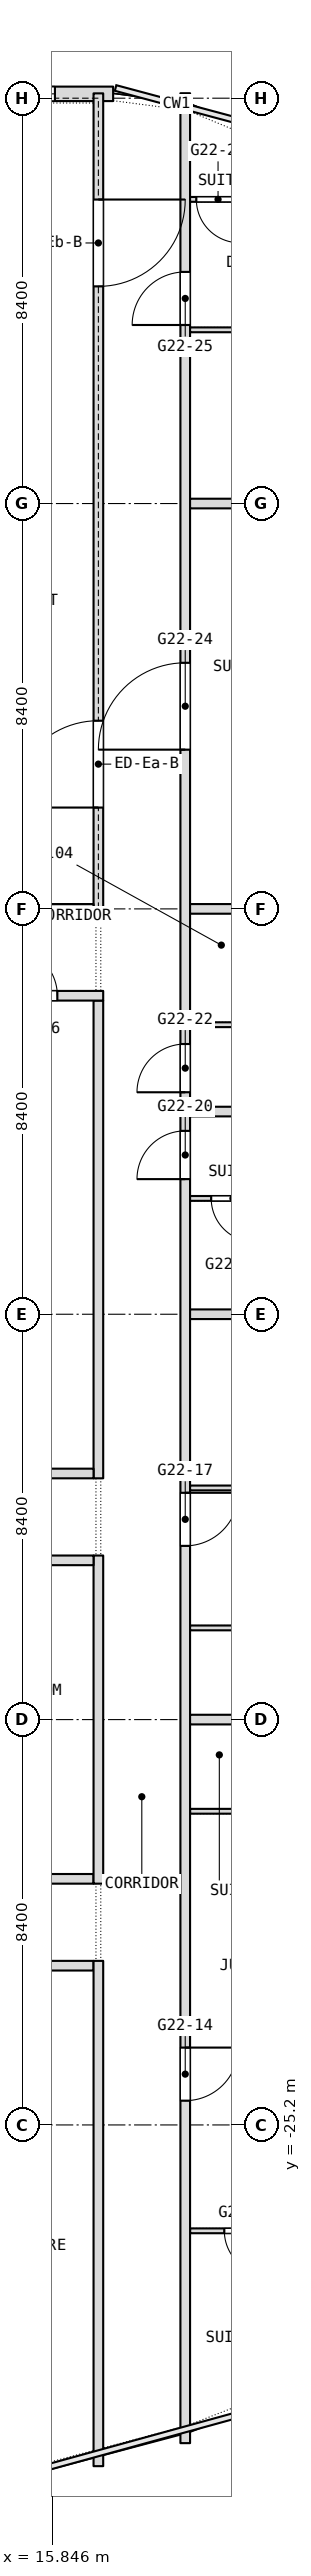
"""IFC4 building model, lengths in metres.
Left out: names, types, materials, properties, quantities, classifications, styles, units other than length and angle.
Written with IfcOpenShell. Run it as: python <this file> out.ifc"""

import sys

from ifc_helpers import new_model, si_unit, direction, frame, frame_2d, origin, place, context, subcontext, project, spatial, rectangle, extrude, element, fill, save


model = new_model("IFC4")
c1 = context("Model", 3, precision=1e-05, world=origin(), true_north=direction((0.0, 1.0)))
c2 = subcontext(c1, "Body", "Model", "MODEL_VIEW")
j1 = project(units=[si_unit("LENGTHUNIT", "METRE"), si_unit("PLANEANGLEUNIT", "RADIAN")], contexts=[c1])
p1 = place(None, origin())
s1 = spatial("IfcSite", under=j1, at=p1, CompositionType="ELEMENT")
p2 = place(p1, origin())
s2 = spatial("IfcBuilding", under=s1, at=p2, CompositionType="ELEMENT")
p3 = place(p2, frame((0.0, 0.0, 266.9)))
s3 = spatial("IfcBuildingStorey", under=s2, at=p3, CompositionType="ELEMENT", Elevation=266.9)
p4 = place(p3, frame((18.7, -27.394, 0.0), z_axis=(0.0, 0.0, 1.0), x_axis=(1.0, 0.0, 0.0)))
e1 = element("IfcWall", 1, at=p4, inside=s3, PredefinedType="PARTITIONING", context=c2, shape_type="SweptSolid", body=[
    extrude(rectangle(XDim=4.151, YDim=0.1, at=frame_2d((2.076, 0.0))), origin(), (0.0, 0.0, 1.0), 3.34),
])
p5 = place(p4, frame((0.71, 0.0, 0.0)))
e2 = element("IfcOpeningElement", 2, at=p5, cuts=e1, PredefinedType="OPENING", context=c2, shape_type="SweptSolid", body=[
    extrude(rectangle(XDim=0.9, YDim=2.1, at=frame_2d((0.45, 1.05))), frame((0.0, 0.05, 0.0), z_axis=(0.0, -1.0, 0.0), x_axis=(1.0, 0.0, 0.0)), (0.0, 0.0, 1.0), 0.1),
])
p6 = place(p3, frame((15.3, -21.9, 0.0), z_axis=(0.0, 0.0, 1.0), x_axis=(1.0, 0.0, 0.0)))
e3 = element("IfcWall", 3, at=p6, inside=s3, PredefinedType="PARTITIONING", context=c2, shape_type="SweptSolid", body=[
    extrude(rectangle(XDim=1.4, YDim=0.2, at=frame_2d((0.7, 0.0))), origin(), (0.0, 0.0, 1.0), 3.34),
])
p7 = place(p3, frame((13.9, -20.1, 0.0), z_axis=(0.0, 0.0, 1.0), x_axis=(1.0, 0.0, 0.0)))
e4 = element("IfcWall", 4, at=p7, inside=s3, PredefinedType="PARTITIONING", context=c2, shape_type="SweptSolid", body=[
    extrude(rectangle(XDim=2.8, YDim=0.2, at=frame_2d((1.4, 0.0))), origin(), (0.0, 0.0, 1.0), 3.34),
])
p8 = place(p3, frame((18.7, -18.7, 0.0), z_axis=(0.0, 0.0, 1.0), x_axis=(1.0, 0.0, 0.0)))
e5 = element("IfcWall", 5, at=p8, inside=s3, PredefinedType="PARTITIONING", context=c2, shape_type="SweptSolid", body=[
    extrude(rectangle(XDim=4.384, YDim=0.1, at=frame_2d((2.192, 0.0))), origin(), (0.0, 0.0, 1.0), 3.34),
])
p9 = place(p8, frame((1.43, 0.0, 0.0)))
e6 = element("IfcOpeningElement", 6, at=p9, cuts=e5, PredefinedType="OPENING", context=c2, shape_type="SweptSolid", body=[
    extrude(rectangle(XDim=0.9, YDim=2.1, at=frame_2d((0.45, 1.05))), frame((0.0, 0.05, 0.0), z_axis=(0.0, -1.0, 0.0), x_axis=(1.0, 0.0, 0.0)), (0.0, 0.0, 1.0), 0.1),
])
p10 = place(p3, frame((18.6, -31.794, 0.0), z_axis=(0.0, 0.0, 1.0), x_axis=(0.0, 1.0, 0.0)))
e7 = element("IfcWall", 7, at=p10, inside=s3, PredefinedType="PARTITIONING", context=c2, shape_type="SweptSolid", body=[
    extrude(rectangle(XDim=48.697, YDim=0.2, at=frame_2d((24.349, 0.0))), origin(), (0.0, 0.0, 1.0), 3.34),
])
p11 = place(p10, frame((7.097, 0.0, 0.0)))
e8 = element("IfcOpeningElement", 8, at=p11, cuts=e7, PredefinedType="OPENING", context=c2, shape_type="SweptSolid", body=[
    extrude(rectangle(XDim=1.1, YDim=2.1, at=frame_2d((0.55, 1.05))), frame((0.0, 0.1, 0.0), z_axis=(0.0, -1.0, 0.0), x_axis=(1.0, 0.0, 0.0)), (0.0, 0.0, 1.0), 0.2),
])
p12 = place(p10, frame((18.594, 0.0, 0.0)))
e9 = element("IfcOpeningElement", 9, at=p12, cuts=e7, PredefinedType="OPENING", context=c2, shape_type="SweptSolid", body=[
    extrude(rectangle(XDim=1.1, YDim=2.1, at=frame_2d((0.55, 1.05))), frame((0.0, 0.1, 0.0), z_axis=(0.0, -1.0, 0.0), x_axis=(1.0, 0.0, 0.0)), (0.0, 0.0, 1.0), 0.2),
])
p13 = place(p10, frame((26.194, 0.0, 0.0)))
e10 = element("IfcOpeningElement", 10, at=p13, cuts=e7, PredefinedType="OPENING", context=c2, shape_type="SweptSolid", body=[
    extrude(rectangle(XDim=1.0, YDim=2.1, at=frame_2d((0.5, 1.05))), frame((0.0, 0.1, 0.0), z_axis=(0.0, -1.0, 0.0), x_axis=(1.0, 0.0, 0.0)), (0.0, 0.0, 1.0), 0.2),
])
p14 = place(p10, frame((27.994, 0.0, 0.0)))
e11 = element("IfcOpeningElement", 11, at=p14, cuts=e7, PredefinedType="OPENING", context=c2, shape_type="SweptSolid", body=[
    extrude(rectangle(XDim=1.0, YDim=2.1, at=frame_2d((0.5, 1.05))), frame((0.0, 0.1, 0.0), z_axis=(0.0, -1.0, 0.0), x_axis=(1.0, 0.0, 0.0)), (0.0, 0.0, 1.0), 0.2),
])
p15 = place(p10, frame((35.094, 0.0, 0.0)))
e12 = element("IfcOpeningElement", 12, at=p15, cuts=e7, PredefinedType="OPENING", context=c2, shape_type="SweptSolid", body=[
    extrude(rectangle(XDim=1.8, YDim=2.1, at=frame_2d((0.9, 1.05))), frame((0.0, 0.1, 0.0), z_axis=(0.0, -1.0, 0.0), x_axis=(1.0, 0.0, 0.0)), (0.0, 0.0, 1.0), 0.2),
])
p16 = place(p10, frame((43.894, 0.0, 0.0)))
e13 = element("IfcOpeningElement", 13, at=p16, cuts=e7, PredefinedType="OPENING", context=c2, shape_type="SweptSolid", body=[
    extrude(rectangle(XDim=1.1, YDim=2.1, at=frame_2d((0.55, 1.05))), frame((0.0, 0.1, 0.0), z_axis=(0.0, -1.0, 0.0), x_axis=(1.0, 0.0, 0.0)), (0.0, 0.0, 1.0), 0.2),
])
p17 = place(p3, frame((16.8, -32.271, 0.0), z_axis=(0.0, 0.0, 1.0), x_axis=(0.0, 1.0, 0.0)))
e14 = element("IfcWall", 14, at=p17, inside=s3, PredefinedType="PARTITIONING", context=c2, shape_type="SweptSolid", body=[
    extrude(rectangle(XDim=10.471, YDim=0.2, at=frame_2d((5.235, 0.0))), origin(), (0.0, 0.0, 1.0), 3.34),
])
p18 = place(p3, frame((16.8, -20.2, 0.0), z_axis=(0.0, 0.0, 1.0), x_axis=(0.0, 1.0, 0.0)))
e15 = element("IfcWall", 15, at=p18, inside=s3, PredefinedType="PARTITIONING", context=c2, shape_type="SweptSolid", body=[
    extrude(rectangle(XDim=6.8, YDim=0.2, at=frame_2d((3.4, 0.0))), origin(), (0.0, 0.0, 1.0), 3.34),
])
p19 = place(p3, frame((16.8, -11.8, 0.0), z_axis=(0.0, 0.0, 1.0), x_axis=(0.0, 1.0, 0.0)))
e16 = element("IfcWall", 16, at=p19, inside=s3, PredefinedType="PARTITIONING", context=c2, shape_type="SweptSolid", body=[
    extrude(rectangle(XDim=9.9, YDim=0.2, at=frame_2d((4.95, 0.0))), origin(), (0.0, 0.0, 1.0), 3.34),
])
p20 = place(p3, frame((18.7, -16.8, 0.0), z_axis=(0.0, 0.0, 1.0), x_axis=(1.0, 0.0, 0.0)))
e17 = element("IfcWall", 17, at=p20, inside=s3, PredefinedType="PARTITIONING", context=c2, shape_type="SweptSolid", body=[
    extrude(rectangle(XDim=4.7, YDim=0.2, at=frame_2d((2.35, 0.0))), origin(), (0.0, 0.0, 1.0), 3.0),
])
p21 = place(p3, frame((18.7, -14.9, 0.0), z_axis=(0.0, 0.0, 1.0), x_axis=(1.0, 0.0, 0.0)))
e18 = element("IfcWall", 18, at=p21, inside=s3, PredefinedType="PARTITIONING", context=c2, shape_type="SweptSolid", body=[
    extrude(rectangle(XDim=3.45, YDim=0.1, at=frame_2d((1.725, 0.0))), origin(), (0.0, 0.0, 1.0), 3.34),
])
p22 = place(p21, frame((1.18, 0.0, 0.0)))
e19 = element("IfcOpeningElement", 19, at=p22, cuts=e18, PredefinedType="OPENING", context=c2, shape_type="SweptSolid", body=[
    extrude(rectangle(XDim=0.9, YDim=2.1, at=frame_2d((0.45, 1.05))), frame((0.0, 0.05, 0.0), z_axis=(0.0, -1.0, 0.0), x_axis=(1.0, 0.0, 0.0)), (0.0, 0.0, 1.0), 0.1),
])
p23 = place(p3, frame((6.0, -13.5, 0.0), z_axis=(0.0, 0.0, 1.0), x_axis=(1.0, 0.0, 0.0)))
e20 = element("IfcWall", 20, at=p23, inside=s3, PredefinedType="PARTITIONING", context=c2, shape_type="SweptSolid", body=[
    extrude(rectangle(XDim=10.7, YDim=0.2, at=frame_2d((5.35, 0.0))), origin(), (0.0, 0.0, 1.0), 3.34),
])
p24 = place(p23, frame((2.45, 0.0, 0.0)))
e21 = element("IfcOpeningElement", 21, at=p24, cuts=e20, PredefinedType="OPENING", context=c2, shape_type="SweptSolid", body=[
    extrude(rectangle(XDim=1.8, YDim=2.1, at=frame_2d((0.9, 1.05))), frame((0.0, 0.1, 0.0), z_axis=(0.0, -1.0, 0.0), x_axis=(1.0, 0.0, 0.0)), (0.0, 0.0, 1.0), 0.2),
])
p25 = place(p23, frame((8.2, 0.0, 0.0)))
e22 = element("IfcOpeningElement", 22, at=p25, cuts=e20, PredefinedType="OPENING", context=c2, shape_type="SweptSolid", body=[
    extrude(rectangle(XDim=1.0, YDim=2.1, at=frame_2d((0.5, 1.05))), frame((0.0, 0.1, 0.0), z_axis=(0.0, -1.0, 0.0), x_axis=(1.0, 0.0, 0.0)), (0.0, 0.0, 1.0), 0.2),
])
p26 = place(p3, frame((18.7, -12.0, 0.0), z_axis=(0.0, 0.0, 1.0), x_axis=(1.0, 0.0, 0.0)))
e23 = element("IfcWall", 23, at=p26, inside=s3, PredefinedType="PARTITIONING", context=c2, shape_type="SweptSolid", body=[
    extrude(rectangle(XDim=4.384, YDim=0.1, at=frame_2d((2.192, 0.0))), origin(), (0.0, 0.0, 1.0), 3.34),
])
p27 = place(p26, frame((1.16, 0.0, 0.0)))
e24 = element("IfcOpeningElement", 24, at=p27, cuts=e23, PredefinedType="OPENING", context=c2, shape_type="SweptSolid", body=[
    extrude(rectangle(XDim=0.9, YDim=2.1, at=frame_2d((0.45, 1.05))), frame((0.0, 0.05, 0.0), z_axis=(0.0, -1.0, 0.0), x_axis=(1.0, 0.0, 0.0)), (0.0, 0.0, 1.0), 0.1),
])
p28 = place(p3, frame((6.2, -11.7, 0.0), z_axis=(0.0, 0.0, 1.0), x_axis=(1.0, 0.0, 0.0)))
e25 = element("IfcWall", 25, at=p28, inside=s3, PredefinedType="PARTITIONING", context=c2, shape_type="SweptSolid", body=[
    extrude(rectangle(XDim=10.5, YDim=0.2, at=frame_2d((5.25, 0.0))), origin(), (0.0, 0.0, 1.0), 3.34),
])
p29 = place(p28, frame((2.75, 0.0, 0.0)))
e26 = element("IfcOpeningElement", 26, at=p29, cuts=e25, PredefinedType="OPENING", context=c2, shape_type="SweptSolid", body=[
    extrude(rectangle(XDim=1.0, YDim=2.1, at=frame_2d((0.5, 1.05))), frame((0.0, 0.1, 0.0), z_axis=(0.0, -1.0, 0.0), x_axis=(1.0, 0.0, 0.0)), (0.0, 0.0, 1.0), 0.2),
])
p30 = place(p3, frame((18.7, -8.4, 0.0), z_axis=(0.0, 0.0, 1.0), x_axis=(1.0, 0.0, 0.0)))
e27 = element("IfcWall", 27, at=p30, inside=s3, PredefinedType="PARTITIONING", context=c2, shape_type="SweptSolid", body=[
    extrude(rectangle(XDim=4.7, YDim=0.2, at=frame_2d((2.35, 0.0))), origin(), (0.0, 0.0, 1.0), 3.0),
])
p31 = place(p3, frame((18.7, -6.0, 0.0), z_axis=(0.0, 0.0, 1.0), x_axis=(1.0, 0.0, 0.0)))
e28 = element("IfcWall", 28, at=p31, inside=s3, PredefinedType="PARTITIONING", context=c2, shape_type="SweptSolid", body=[
    extrude(rectangle(XDim=2.1, YDim=0.1, at=frame_2d((1.05, 0.0))), origin(), (0.0, 0.0, 1.0), 3.34),
])
p32 = place(p31, frame((0.438, 0.0, 0.0)))
e29 = element("IfcOpeningElement", 29, at=p32, cuts=e28, PredefinedType="OPENING", context=c2, shape_type="SweptSolid", body=[
    extrude(rectangle(XDim=0.9, YDim=2.1, at=frame_2d((0.45, 1.05))), frame((0.0, 0.05, 0.0), z_axis=(0.0, -1.0, 0.0), x_axis=(1.0, 0.0, 0.0)), (0.0, 0.0, 1.0), 0.1),
])
p33 = place(p3, frame((18.7, -4.2, 0.0), z_axis=(0.0, 0.0, 1.0), x_axis=(1.0, 0.0, 0.0)))
e30 = element("IfcWall", 30, at=p33, inside=s3, PredefinedType="PARTITIONING", context=c2, shape_type="SweptSolid", body=[
    extrude(rectangle(XDim=4.7, YDim=0.2, at=frame_2d((2.35, 0.0))), origin(), (0.0, 0.0, 1.0), 3.34),
])
p34 = place(p3, frame((18.7, -2.4, 0.0), z_axis=(0.0, 0.0, 1.0), x_axis=(1.0, 0.0, 0.0)))
e31 = element("IfcWall", 31, at=p34, inside=s3, PredefinedType="PARTITIONING", context=c2, shape_type="SweptSolid", body=[
    extrude(rectangle(XDim=2.2, YDim=0.1, at=frame_2d((1.1, 0.0))), origin(), (0.0, 0.0, 1.0), 3.34),
])
p35 = place(p3, frame((14.8, -1.8, 0.0), z_axis=(0.0, 0.0, 1.0), x_axis=(1.0, 0.0, 0.0)))
e32 = element("IfcWall", 32, at=p35, inside=s3, PredefinedType="PARTITIONING", context=c2, shape_type="SweptSolid", body=[
    extrude(rectangle(XDim=2.1, YDim=0.2, at=frame_2d((1.05, 0.0))), origin(), (0.0, 0.0, 1.0), 3.34),
])
p36 = place(p35, frame((0.15, 0.0, 0.0)))
e33 = element("IfcOpeningElement", 33, at=p36, cuts=e32, PredefinedType="OPENING", context=c2, shape_type="SweptSolid", body=[
    extrude(rectangle(XDim=1.0, YDim=2.1, at=frame_2d((0.5, 1.05))), frame((0.0, 0.1, 0.0), z_axis=(0.0, -1.0, 0.0), x_axis=(1.0, 0.0, 0.0)), (0.0, 0.0, 1.0), 0.2),
])
for number, where, z_axis, x_axis in (
    (34, (18.7, 0.0, 0.0), (0.0, 0.0, 1.0), (1.0, 0.0, 0.0)),
    (35, (18.7, 8.4, 0.0), (0.0, 0.0, 1.0), (1.0, 0.0, 0.0)),
):
    element("IfcWall", number, at=place(p3, frame(where, z_axis=z_axis, x_axis=x_axis)), inside=s3, PredefinedType="PARTITIONING", context=c2, shape_type="SweptSolid", body=[
        extrude(rectangle(XDim=4.7, YDim=0.2, at=frame_2d((2.35, 0.0))), origin(), (0.0, 0.0, 1.0), 3.0),
    ])
p37 = place(p3, frame((18.7, 12.0, 0.0), z_axis=(0.0, 0.0, 1.0), x_axis=(1.0, 0.0, 0.0)))
e36 = element("IfcWall", 36, at=p37, inside=s3, PredefinedType="PARTITIONING", context=c2, shape_type="SweptSolid", body=[
    extrude(rectangle(XDim=4.275, YDim=0.1, at=frame_2d((2.138, 0.0))), origin(), (0.0, 0.0, 1.0), 3.34),
])
p38 = place(p3, frame((18.7, 14.703, 0.0), z_axis=(0.0, 0.0, 1.0), x_axis=(1.0, 0.0, 0.0)))
e37 = element("IfcWall", 37, at=p38, inside=s3, PredefinedType="PARTITIONING", context=c2, shape_type="SweptSolid", body=[
    extrude(rectangle(XDim=1.335, YDim=0.1, at=frame_2d((0.667, 0.0))), origin(), (0.0, 0.0, 1.0), 3.34),
])
p39 = place(p38, frame((0.13, 0.0, 0.0)))
e38 = element("IfcOpeningElement", 38, at=p39, cuts=e37, PredefinedType="OPENING", context=c2, shape_type="SweptSolid", body=[
    extrude(rectangle(XDim=0.9, YDim=2.1, at=frame_2d((0.45, 1.05))), frame((0.0, 0.05, 0.0), z_axis=(0.0, -1.0, 0.0), x_axis=(1.0, 0.0, 0.0)), (0.0, 0.0, 1.0), 0.1),
])
p40 = place(p3, frame((17.106, 16.89, 0.0), z_axis=(0.0, 0.0, 1.0), x_axis=(-1.0, 0.0, 0.0)))
e39 = element("IfcWall", 39, at=p40, inside=s3, PredefinedType="NOTDEFINED", context=c2, shape_type="SweptSolid", body=[
    extrude(rectangle(XDim=4.506, YDim=0.3, at=frame_2d((2.253, 0.0))), origin(), (0.0, 0.0, 1.0), 3.6),
])
p41 = place(p40, frame((1.206, 0.0, 0.9)))
e40 = element("IfcOpeningElement", 40, at=p41, cuts=e39, PredefinedType="OPENING", context=c2, shape_type="SweptSolid", body=[
    extrude(rectangle(XDim=2.4, YDim=2.1, at=frame_2d((1.2, 1.05))), frame((0.0, 0.15, 0.0), z_axis=(0.0, -1.0, 0.0), x_axis=(1.0, 0.0, 0.0)), (0.0, 0.0, 1.0), 0.3),
])
p42 = place(p3, frame((16.8, -0.1, 0.0), z_axis=(0.0, 0.0, 1.0), x_axis=(0.0, 1.0, 0.0)))
e41 = element("IfcWall", 41, at=p42, inside=s3, PredefinedType="PARTITIONING", context=c2, shape_type="SweptSolid", body=[
    extrude(rectangle(XDim=17.0, YDim=0.2, at=frame_2d((8.5, 0.0))), origin(), (0.0, 0.0, 1.0), 3.34),
])
p43 = place(p42, frame((2.2, 0.0, 0.0)))
e42 = element("IfcOpeningElement", 42, at=p43, cuts=e41, PredefinedType="OPENING", context=c2, shape_type="SweptSolid", body=[
    extrude(rectangle(XDim=1.8, YDim=2.1, at=frame_2d((0.9, 1.05))), frame((0.0, 0.1, 0.0), z_axis=(0.0, -1.0, 0.0), x_axis=(1.0, 0.0, 0.0)), (0.0, 0.0, 1.0), 0.2),
])
p44 = place(p42, frame((13.0, 0.0, 0.0)))
e43 = element("IfcOpeningElement", 43, at=p44, cuts=e41, PredefinedType="OPENING", context=c2, shape_type="SweptSolid", body=[
    extrude(rectangle(XDim=1.8, YDim=2.1, at=frame_2d((0.9, 1.05))), frame((0.0, 0.1, 0.0), z_axis=(0.0, -1.0, 0.0), x_axis=(1.0, 0.0, 0.0)), (0.0, 0.0, 1.0), 0.2),
])
p45 = place(p3, frame((11.7, 0.0, 0.0), z_axis=(0.0, 0.0, 1.0), x_axis=(1.0, 0.0, 0.0)))
e44 = element("IfcWall", 44, at=p45, inside=s3, PredefinedType="PARTITIONING", context=c2, shape_type="SweptSolid", body=[
    extrude(rectangle(XDim=5.0, YDim=0.2, at=frame_2d((2.5, 0.0))), origin(), (0.0, 0.0, 1.0), 3.0),
])
p46 = place(p45, frame((1.7, 0.0, 0.0)))
e45 = element("IfcOpeningElement", 45, at=p46, cuts=e44, PredefinedType="OPENING", context=c2, shape_type="SweptSolid", body=[
    extrude(rectangle(XDim=1.2, YDim=2.1, at=frame_2d((0.6, 1.05))), frame((0.0, 0.1, 0.0), z_axis=(0.0, -1.0, 0.0), x_axis=(1.0, 0.0, 0.0)), (0.0, 0.0, 1.0), 0.2),
])
p47 = place(p5, origin())
e46 = element("IfcDoor", 46, at=p47, inside=s3, OperationType="SINGLE_SWING_LEFT", PredefinedType="DOOR", context=c2, shape_type="SweptSolid", body=[
    extrude(rectangle(XDim=0.9, YDim=2.1, at=frame_2d((0.45, 1.05))), frame((0.0, 0.025, 0.0), z_axis=(0.0, -1.0, 0.0), x_axis=(1.0, 0.0, 0.0)), (0.0, 0.0, 1.0), 0.05),
])
fill(e2, e46)
p48 = place(p11, origin())
e47 = element("IfcDoor", 47, at=p48, inside=s3, OperationType="SINGLE_SWING_RIGHT", PredefinedType="DOOR", context=c2, shape_type="SweptSolid", body=[
    extrude(rectangle(XDim=1.1, YDim=2.1, at=frame_2d((0.55, 1.05))), frame((0.0, 0.025, 0.0), z_axis=(0.0, -1.0, 0.0), x_axis=(1.0, 0.0, 0.0)), (0.0, 0.0, 1.0), 0.05),
])
fill(e8, e47)
p49 = place(p12, origin())
e48 = element("IfcDoor", 48, at=p49, inside=s3, OperationType="SINGLE_SWING_LEFT", PredefinedType="DOOR", context=c2, shape_type="SweptSolid", body=[
    extrude(rectangle(XDim=1.1, YDim=2.1, at=frame_2d((0.55, 1.05))), frame((0.0, 0.025, 0.0), z_axis=(0.0, -1.0, 0.0), x_axis=(1.0, 0.0, 0.0)), (0.0, 0.0, 1.0), 0.05),
])
fill(e9, e48)
p50 = place(p13, origin())
e49 = element("IfcDoor", 49, at=p50, inside=s3, OperationType="SINGLE_SWING_RIGHT", PredefinedType="DOOR", context=c2, shape_type="SweptSolid", body=[
    extrude(rectangle(XDim=1.0, YDim=2.1, at=frame_2d((0.5, 1.05))), frame((0.0, 0.025, 0.0), z_axis=(0.0, -1.0, 0.0), x_axis=(1.0, 0.0, 0.0)), (0.0, 0.0, 1.0), 0.05),
])
fill(e10, e49)
p51 = place(p14, origin())
e50 = element("IfcDoor", 50, at=p51, inside=s3, OperationType="SINGLE_SWING_RIGHT", PredefinedType="DOOR", context=c2, shape_type="SweptSolid", body=[
    extrude(rectangle(XDim=1.0, YDim=2.1, at=frame_2d((0.5, 1.05))), frame((0.0, 0.025, 0.0), z_axis=(0.0, -1.0, 0.0), x_axis=(1.0, 0.0, 0.0)), (0.0, 0.0, 1.0), 0.05),
])
fill(e11, e50)
p52 = place(p15, origin())
e51 = element("IfcDoor", 51, at=p52, inside=s3, OperationType="DOUBLE_DOOR_SINGLE_SWING", PredefinedType="DOOR", context=c2, shape_type="SweptSolid", body=[
    extrude(rectangle(XDim=1.8, YDim=2.1, at=frame_2d((0.9, 1.05))), frame((0.0, 0.025, 0.0), z_axis=(0.0, -1.0, 0.0), x_axis=(1.0, 0.0, 0.0)), (0.0, 0.0, 1.0), 0.05),
])
fill(e12, e51)
p53 = place(p16, origin())
e52 = element("IfcDoor", 52, at=p53, inside=s3, OperationType="SINGLE_SWING_RIGHT", PredefinedType="DOOR", context=c2, shape_type="SweptSolid", body=[
    extrude(rectangle(XDim=1.1, YDim=2.1, at=frame_2d((0.55, 1.05))), frame((0.0, 0.025, 0.0), z_axis=(0.0, -1.0, 0.0), x_axis=(1.0, 0.0, 0.0)), (0.0, 0.0, 1.0), 0.05),
])
fill(e13, e52)
p54 = place(p32, origin())
e53 = element("IfcDoor", 53, at=p54, inside=s3, OperationType="SINGLE_SWING_RIGHT", PredefinedType="DOOR", context=c2, shape_type="SweptSolid", body=[
    extrude(rectangle(XDim=0.9, YDim=2.1, at=frame_2d((0.45, 1.05))), frame((0.0, 0.025, 0.0), z_axis=(0.0, -1.0, 0.0), x_axis=(1.0, 0.0, 0.0)), (0.0, 0.0, 1.0), 0.05),
])
fill(e29, e53)
p55 = place(p36, origin())
e54 = element("IfcDoor", 54, at=p55, inside=s3, OperationType="SINGLE_SWING_LEFT", PredefinedType="DOOR", context=c2, shape_type="SweptSolid", body=[
    extrude(rectangle(XDim=1.0, YDim=2.1, at=frame_2d((0.5, 1.05))), frame((0.0, 0.025, 0.0), z_axis=(0.0, -1.0, 0.0), x_axis=(1.0, 0.0, 0.0)), (0.0, 0.0, 1.0), 0.05),
])
fill(e33, e54)
p56 = place(p39, origin())
e55 = element("IfcDoor", 55, at=p56, inside=s3, OperationType="SINGLE_SWING_RIGHT", PredefinedType="DOOR", context=c2, shape_type="SweptSolid", body=[
    extrude(rectangle(XDim=0.9, YDim=2.1, at=frame_2d((0.45, 1.05))), frame((0.0, 0.025, 0.0), z_axis=(0.0, -1.0, 0.0), x_axis=(1.0, 0.0, 0.0)), (0.0, 0.0, 1.0), 0.05),
])
fill(e38, e55)
p57 = place(p41, origin())
e56 = element("IfcWindow", 56, at=p57, inside=s3, PartitioningType="SINGLE_PANEL", PredefinedType="WINDOW", context=c2, shape_type="SweptSolid", body=[
    extrude(rectangle(XDim=2.4, YDim=2.1, at=frame_2d((1.2, 1.05))), frame((0.0, 0.03, 0.0), z_axis=(0.0, -1.0, 0.0), x_axis=(1.0, 0.0, 0.0)), (0.0, 0.0, 1.0), 0.06),
])
fill(e40, e56)
p58 = place(p43, origin())
e57 = element("IfcDoor", 57, at=p58, inside=s3, OperationType="DOUBLE_DOOR_SINGLE_SWING", PredefinedType="DOOR", context=c2, shape_type="SweptSolid", body=[
    extrude(rectangle(XDim=1.8, YDim=2.1, at=frame_2d((0.9, 1.05))), frame((0.0, 0.025, 0.0), z_axis=(0.0, -1.0, 0.0), x_axis=(1.0, 0.0, 0.0)), (0.0, 0.0, 1.0), 0.05),
])
fill(e42, e57)
p59 = place(p44, origin())
e58 = element("IfcDoor", 58, at=p59, inside=s3, OperationType="DOUBLE_DOOR_SINGLE_SWING", PredefinedType="DOOR", context=c2, shape_type="SweptSolid", body=[
    extrude(rectangle(XDim=1.8, YDim=2.1, at=frame_2d((0.9, 1.05))), frame((0.0, 0.025, 0.0), z_axis=(0.0, -1.0, 0.0), x_axis=(1.0, 0.0, 0.0)), (0.0, 0.0, 1.0), 0.05),
])
fill(e43, e58)
save(model, sys.argv[1])
